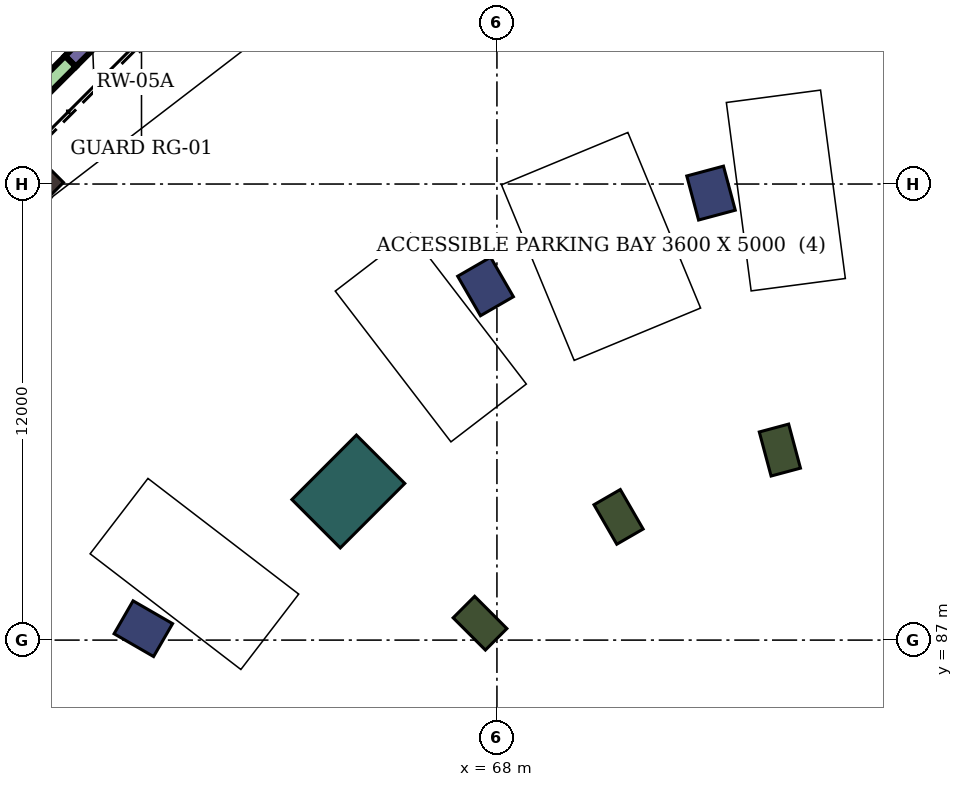
"""IFC4 building model, lengths in metres.
Left out: names, types, materials, properties, quantities, classifications, styles, units other than length and angle.
Written with IfcOpenShell. Run it as: python <this file> out.ifc"""

import sys

from ifc_helpers import new_model, si_unit, direction, frame, frame_2d, origin, origin_2d, place, context, subcontext, project, spatial, rectangle, extrude, element, save


model = new_model("IFC4")
c1 = context("Model", 3, precision=1e-05, world=origin(), true_north=direction((0.0, 1.0)))
c2 = subcontext(c1, "Body", "Model", "MODEL_VIEW")
j1 = project(units=[si_unit("LENGTHUNIT", "METRE"), si_unit("PLANEANGLEUNIT", "RADIAN")], contexts=[c1])
p1 = place(None, origin())
s1 = spatial("IfcSite", under=j1, at=p1, CompositionType="ELEMENT")
p2 = place(p1, origin())
s2 = spatial("IfcBuilding", under=s1, at=p2, CompositionType="ELEMENT")
p3 = place(p2, frame((0.0, 0.0, -9.0)))
s3 = spatial("IfcBuildingStorey", under=s2, at=p3, CompositionType="ELEMENT", Elevation=-9.0)
p4 = place(p3, frame((55.958, 99.042, 0.0), z_axis=(0.0, 0.0, 1.0), x_axis=(-0.707106781187, 0.707106781187, 0.0)))
e1 = element("IfcColumn", 1, at=p4, inside=s3, PredefinedType="COLUMN", context=c2, shape_type="SweptSolid", body=[
    extrude(rectangle(XDim=0.9, YDim=0.9, at=origin_2d()), origin(), (0.0, 0.0, 1.0), 4.5),
])
for number, where, z_axis, x_axis in (
    (2, (73.633, 98.762, 0.0), (0.0, 0.0, 1.0), (-0.259, 0.966, 0.0)),
    (3, (67.7, 96.304, 0.0), (0.0, 0.0, 1.0), (-0.5, 0.866, 0.0)),
    (4, (58.696, 87.3, 0.0), (0.0, 0.0, 1.0), (-0.866, 0.5, 0.0)),
):
    element("IfcColumn", number, at=place(p3, frame(where, z_axis=z_axis, x_axis=x_axis)), inside=s3, PredefinedType="COLUMN", context=c2, shape_type="SweptSolid", body=[
        extrude(rectangle(XDim=1.2, YDim=1.0, at=origin_2d()), origin(), (0.0, 0.0, 1.0), 4.5),
    ])
for number, where, z_axis, x_axis in (
    (5, (75.445, 92.0, 0.0), (0.0, 0.0, 1.0), (-0.259, 0.966, 0.0)),
    (6, (71.2, 90.242, 0.0), (0.0, 0.0, 1.0), (-0.5, 0.866, 0.0)),
    (7, (67.555, 87.445, 0.0), (0.0, 0.0, 1.0), (-0.707, 0.707, 0.0)),
):
    element("IfcColumn", number, at=place(p3, frame(where, z_axis=z_axis, x_axis=x_axis)), inside=s3, PredefinedType="COLUMN", context=c2, shape_type="SweptSolid", body=[
        extrude(rectangle(XDim=1.2, YDim=0.8, at=origin_2d()), origin(), (0.0, 0.0, 1.0), 4.5),
    ])
p5 = place(p3, frame((64.09, 90.91, 0.0), z_axis=(0.0, 0.0, 1.0), x_axis=(-0.707106781187, 0.707106781187, 0.0)))
e8 = element("IfcColumn", 8, at=p5, inside=s3, PredefinedType="COLUMN", context=c2, shape_type="SweptSolid", body=[
    extrude(rectangle(XDim=1.8, YDim=2.4, at=origin_2d()), origin(), (0.0, 0.0, 1.0), 4.5),
])
p6 = place(p3, frame((57.934, 103.386, 0.0), z_axis=(0.0, 0.0, 1.0), x_axis=(-0.707106781187, -0.707106781187, 0.0)))
e9 = element("IfcWall", 9, at=p6, inside=s3, PredefinedType="STANDARD", context=c2, shape_type="SweptSolid", body=[
    extrude(rectangle(XDim=1.636, YDim=0.4, at=frame_2d((0.818, 0.0))), origin(), (0.0, 0.0, 1.0), 1.084),
])
p7 = place(p3, frame((56.777, 102.229, 0.0), z_axis=(0.0, 0.0, 1.0), x_axis=(-0.707177424753, -0.707036130562, 0.0)))
e10 = element("IfcWall", 10, at=p7, inside=s3, PredefinedType="STANDARD", context=c2, shape_type="SweptSolid", body=[
    extrude(rectangle(XDim=1.728, YDim=0.4, at=frame_2d((0.864, 0.0))), origin(), (0.0, 0.0, 1.0), 0.823),
])
save(model, sys.argv[1])
